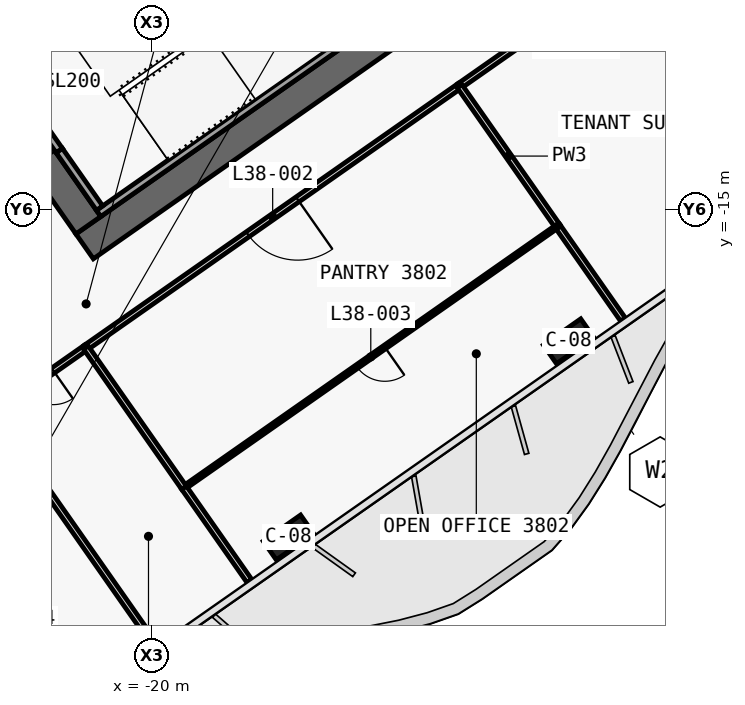
"""IFC4 building model, lengths in metres.
Left out: names, types, materials, properties, quantities, classifications, styles, units other than length and angle.
Written with IfcOpenShell. Run it as: python <this file> out.ifc"""

import sys

from ifc_helpers import new_model, si_unit, direction, frame, frame_2d, origin, origin_2d, place, context, subcontext, project, spatial, polyline, rectangle, outline, extrude, element, fill, save


model = new_model("IFC4")
c1 = context("Model", 3, precision=1e-05, world=origin(), true_north=direction((0.0, 1.0)))
c2 = subcontext(c1, "Body", "Model", "MODEL_VIEW")
j1 = project(units=[si_unit("LENGTHUNIT", "METRE"), si_unit("PLANEANGLEUNIT", "RADIAN")], contexts=[c1])
p1 = place(None, origin())
s1 = spatial("IfcSite", under=j1, at=p1, CompositionType="ELEMENT")
p2 = place(p1, origin())
s2 = spatial("IfcBuilding", under=s1, at=p2, CompositionType="ELEMENT")
p3 = place(p2, frame((0.0, 0.0, 167.1)))
s3 = spatial("IfcBuildingStorey", under=s2, at=p3, CompositionType="ELEMENT", Elevation=167.1)
p4 = place(p3, frame((0.029, -0.712, 0.0), z_axis=(0.0, 0.0, 1.0), x_axis=(-0.819151758019, -0.573576845187, 0.0)))
e1 = element("IfcWall", 1, at=p4, inside=s3, PredefinedType="SHEAR", context=c2, shape_type="SweptSolid", body=[
    extrude(outline(polyline([(26.616, 0.4), (0.56, 0.4), (-0.0, -0.4), (26.616, -0.4), (26.616, 0.4)])), origin(), (0.0, 0.0, 1.0), 3.9),
])
p5 = place(p4, frame((2.966, 0.0, 0.0)))
e2 = element("IfcOpeningElement", 2, at=p5, cuts=e1, PredefinedType="OPENING", context=c2, shape_type="SweptSolid", body=[
    extrude(rectangle(XDim=2.4, YDim=2.1, at=frame_2d((1.2, 1.05))), frame((0.0, 0.41, 0.0), z_axis=(0.0, -1.0, 0.0), x_axis=(1.0, 0.0, 0.0)), (0.0, 0.0, 1.0), 0.82),
])
p6 = place(p4, frame((11.916, 0.0, 0.0)))
e3 = element("IfcOpeningElement", 3, at=p6, cuts=e1, PredefinedType="OPENING", context=c2, shape_type="SweptSolid", body=[
    extrude(rectangle(XDim=2.4, YDim=2.1, at=frame_2d((1.2, 1.05))), frame((0.0, 0.41, 0.0), z_axis=(0.0, -1.0, 0.0), x_axis=(1.0, 0.0, 0.0)), (0.0, 0.0, 1.0), 0.82),
])
p7 = place(p3, frame((-21.675, -15.421, 0.0), z_axis=(0.0, 0.0, 1.0), x_axis=(-0.573581815061, 0.819148278049, 0.0)))
e4 = element("IfcWall", 4, at=p7, inside=s3, PredefinedType="SHEAR", context=c2, shape_type="SweptSolid", body=[
    extrude(outline(polyline([(0.0, 0.4), (0.0, -0.4), (9.6, -0.4), (9.6, 0.4), (0.0, 0.4)])), origin(), (0.0, 0.0, 1.0), 3.9),
])
p8 = place(p7, frame((6.3, 0.0, 0.0)))
e5 = element("IfcOpeningElement", 5, at=p8, cuts=e4, PredefinedType="OPENING", context=c2, shape_type="SweptSolid", body=[
    extrude(rectangle(XDim=1.8, YDim=2.1, at=frame_2d((0.9, 1.05))), frame((0.0, 0.41, 0.0), z_axis=(0.0, -1.0, 0.0), x_axis=(1.0, 0.0, 0.0)), (0.0, 0.0, 1.0), 0.82),
])
p9 = place(p7, frame((2.1, 0.0, 0.0)))
e6 = element("IfcOpeningElement", 6, at=p9, cuts=e4, PredefinedType="OPENING", context=c2, shape_type="SweptSolid", body=[
    extrude(rectangle(XDim=1.8, YDim=2.1, at=frame_2d((0.9, 1.05))), frame((0.0, 0.41, 0.0), z_axis=(0.0, -1.0, 0.0), x_axis=(1.0, 0.0, 0.0)), (0.0, 0.0, 1.0), 0.82),
])
p10 = place(p3, frame((-2.638, 3.768, 0.0), z_axis=(0.0, 0.0, 1.0), x_axis=(-0.81915267502, -0.573575535572, 0.0)))
e7 = element("IfcWall", 7, at=p10, inside=s3, PredefinedType="SHEAR", context=c2, shape_type="SweptSolid", body=[
    extrude(outline(polyline([(26.2, 0.2), (0.0, 0.2), (0.0, -0.2), (26.2, -0.2), (26.2, 0.2)])), origin(), (0.0, 0.0, 1.0), 3.9),
])
p11 = place(p10, frame((1.169, 0.0, 0.0)))
e8 = element("IfcOpeningElement", 8, at=p11, cuts=e7, PredefinedType="OPENING", context=c2, shape_type="SweptSolid", body=[
    extrude(rectangle(XDim=1.1, YDim=2.1, at=frame_2d((0.55, 1.05))), frame((0.0, 0.21, 0.0), z_axis=(0.0, -1.0, 0.0), x_axis=(1.0, 0.0, 0.0)), (0.0, 0.0, 1.0), 0.42),
])
p12 = place(p10, frame((3.206, 0.0, 0.0)))
e9 = element("IfcOpeningElement", 9, at=p12, cuts=e7, PredefinedType="OPENING", context=c2, shape_type="SweptSolid", body=[
    extrude(rectangle(XDim=1.1, YDim=2.1, at=frame_2d((0.55, 1.05))), frame((0.0, 0.21, 0.0), z_axis=(0.0, -1.0, 0.0), x_axis=(1.0, 0.0, 0.0)), (0.0, 0.0, 1.0), 0.42),
])
p13 = place(p10, frame((5.244, 0.0, 0.0)))
e10 = element("IfcOpeningElement", 10, at=p13, cuts=e7, PredefinedType="OPENING", context=c2, shape_type="SweptSolid", body=[
    extrude(rectangle(XDim=1.1, YDim=2.1, at=frame_2d((0.55, 1.05))), frame((0.0, 0.21, 0.0), z_axis=(0.0, -1.0, 0.0), x_axis=(1.0, 0.0, 0.0)), (0.0, 0.0, 1.0), 0.42),
])
p14 = place(p10, frame((7.281, 0.0, 0.0)))
e11 = element("IfcOpeningElement", 11, at=p14, cuts=e7, PredefinedType="OPENING", context=c2, shape_type="SweptSolid", body=[
    extrude(rectangle(XDim=1.1, YDim=2.1, at=frame_2d((0.55, 1.05))), frame((0.0, 0.21, 0.0), z_axis=(0.0, -1.0, 0.0), x_axis=(1.0, 0.0, 0.0)), (0.0, 0.0, 1.0), 0.42),
])
p15 = place(p10, frame((9.688, 0.0, 0.0)))
e12 = element("IfcOpeningElement", 12, at=p15, cuts=e7, PredefinedType="OPENING", context=c2, shape_type="SweptSolid", body=[
    extrude(rectangle(XDim=1.1, YDim=2.1, at=frame_2d((0.55, 1.05))), frame((0.0, 0.21, 0.0), z_axis=(0.0, -1.0, 0.0), x_axis=(1.0, 0.0, 0.0)), (0.0, 0.0, 1.0), 0.42),
])
p16 = place(p10, frame((11.863, 0.0, 0.0)))
e13 = element("IfcOpeningElement", 13, at=p16, cuts=e7, PredefinedType="OPENING", context=c2, shape_type="SweptSolid", body=[
    extrude(rectangle(XDim=1.1, YDim=2.1, at=frame_2d((0.55, 1.05))), frame((0.0, 0.21, 0.0), z_axis=(0.0, -1.0, 0.0), x_axis=(1.0, 0.0, 0.0)), (0.0, 0.0, 1.0), 0.42),
])
p17 = place(p10, frame((14.038, 0.0, 0.0)))
e14 = element("IfcOpeningElement", 14, at=p17, cuts=e7, PredefinedType="OPENING", context=c2, shape_type="SweptSolid", body=[
    extrude(rectangle(XDim=1.1, YDim=2.1, at=frame_2d((0.55, 1.05))), frame((0.0, 0.21, 0.0), z_axis=(0.0, -1.0, 0.0), x_axis=(1.0, 0.0, 0.0)), (0.0, 0.0, 1.0), 0.42),
])
p18 = place(p10, frame((16.212, 0.0, 0.0)))
e15 = element("IfcOpeningElement", 15, at=p18, cuts=e7, PredefinedType="OPENING", context=c2, shape_type="SweptSolid", body=[
    extrude(rectangle(XDim=1.1, YDim=2.1, at=frame_2d((0.55, 1.05))), frame((0.0, 0.21, 0.0), z_axis=(0.0, -1.0, 0.0), x_axis=(1.0, 0.0, 0.0)), (0.0, 0.0, 1.0), 0.42),
])
for number, where, z_axis, x_axis in (
    (16, (-9.038, -18.475, 0.0), (0.0, 0.0, 1.0), (-0.819, -0.574, 0.0)),
    (17, (-16.41, -23.637, 0.0), (0.0, 0.0, 1.0), (-0.819, -0.574, 0.0)),
):
    element("IfcColumn", number, at=place(p3, frame(where, z_axis=z_axis, x_axis=x_axis)), inside=s3, PredefinedType="COLUMN", context=c2, shape_type="SweptSolid", body=[
        extrude(rectangle(XDim=1.2, YDim=0.6, at=origin_2d()), origin(), (0.0, 0.0, 1.0), 3.9),
    ])
p19 = place(p3, frame((-14.851, -10.521, 0.0), z_axis=(0.0, 0.0, 1.0), x_axis=(-0.819141584393, -0.57359137434, 0.0)))
e18 = element("IfcWall", 18, at=p19, inside=s3, PredefinedType="SOLIDWALL", context=c2, shape_type="SweptSolid", body=[
    extrude(rectangle(XDim=8.0, YDim=0.2, at=frame_2d((4.0, 0.0))), origin(), (0.0, 0.0, 1.0), 3.62),
])
p20 = place(p3, frame((-21.38, -14.97, 0.0), z_axis=(0.0, 0.0, 1.0), x_axis=(-0.573559770908, 0.819163713305, 0.0)))
e19 = element("IfcWall", 19, at=p20, inside=s3, PredefinedType="SOLIDWALL", context=c2, shape_type="SweptSolid", body=[
    extrude(rectangle(XDim=1.85, YDim=0.2, at=frame_2d((0.925, 0.0))), origin(), (0.0, 0.0, 1.0), 3.62),
])
p21 = place(p3, frame((-22.441, -13.455, 2.15), z_axis=(0.0, 0.0, 1.0), x_axis=(-0.573591692345, 0.819141361715, 0.0)))
e20 = element("IfcWall", 20, at=p21, inside=s3, PredefinedType="SOLIDWALL", context=c2, shape_type="SweptSolid", body=[
    extrude(rectangle(XDim=1.9, YDim=0.2, at=frame_2d((0.95, 0.0))), origin(), (0.0, 0.0, 1.0), 1.47),
])
p22 = place(p3, frame((-5.766, -7.456, 0.0), z_axis=(0.0, 0.0, 1.0), x_axis=(-0.819150881364, -0.573578097177, 0.0)))
e21 = element("IfcWall", 21, at=p22, inside=s3, PredefinedType="PARTITIONING", context=c2, shape_type="SweptSolid", body=[
    extrude(rectangle(XDim=7.502, YDim=0.15, at=frame_2d((3.751, 0.0))), origin(), (0.0, 0.0, 1.0), 3.0),
])
p23 = place(p22, frame((2.951, 0.0, 0.0)))
e22 = element("IfcOpeningElement", 22, at=p23, cuts=e21, PredefinedType="OPENING", context=c2, shape_type="SweptSolid", body=[
    extrude(rectangle(XDim=1.6, YDim=2.1, at=frame_2d((0.8, 1.05))), frame((0.0, 0.085, 0.0), z_axis=(0.0, -1.0, 0.0), x_axis=(1.0, 0.0, 0.0)), (0.0, 0.0, 1.0), 0.17),
])
p24 = place(p3, frame((-11.908, -11.757, 0.0), z_axis=(0.0, 0.0, 1.0), x_axis=(-0.81915738424, -0.573568810035, 0.0)))
e23 = element("IfcWall", 23, at=p24, inside=s3, PredefinedType="PARTITIONING", context=c2, shape_type="SweptSolid", body=[
    extrude(rectangle(XDim=12.004, YDim=0.15, at=frame_2d((6.002, 0.0))), origin(), (0.0, 0.0, 1.0), 3.0),
])
p25 = place(p24, frame((5.202, 0.0, 0.0)))
e24 = element("IfcOpeningElement", 24, at=p25, cuts=e23, PredefinedType="OPENING", context=c2, shape_type="SweptSolid", body=[
    extrude(rectangle(XDim=1.6, YDim=2.1, at=frame_2d((0.8, 1.05))), frame((0.0, 0.085, 0.0), z_axis=(0.0, -1.0, 0.0), x_axis=(1.0, 0.0, 0.0)), (0.0, 0.0, 1.0), 0.17),
])
p26 = place(p3, frame((-21.738, -18.639, 0.0), z_axis=(0.0, 0.0, 1.0), x_axis=(-0.819128818764, -0.573609604409, 0.0)))
e25 = element("IfcWall", 25, at=p26, inside=s3, PredefinedType="PARTITIONING", context=c2, shape_type="SweptSolid", body=[
    extrude(rectangle(XDim=3.004, YDim=0.15, at=frame_2d((1.502, 0.0))), origin(), (0.0, 0.0, 1.0), 3.62),
])
p27 = place(p26, frame((1.052, 0.0, 0.0)))
e26 = element("IfcOpeningElement", 26, at=p27, cuts=e25, PredefinedType="OPENING", context=c2, shape_type="SweptSolid", body=[
    extrude(rectangle(XDim=0.9, YDim=2.1, at=frame_2d((0.45, 1.05))), frame((0.0, 0.085, 0.0), z_axis=(0.0, -1.0, 0.0), x_axis=(1.0, 0.0, 0.0)), (0.0, 0.0, 1.0), 0.17),
])
p28 = place(p3, frame((-7.608, -17.901, 0.0), z_axis=(0.0, 0.0, 1.0), x_axis=(-0.573609750632, 0.819128716369, 0.0)))
e27 = element("IfcWall", 27, at=p28, inside=s3, PredefinedType="PARTITIONING", context=c2, shape_type="SweptSolid", body=[
    extrude(rectangle(XDim=3.001, YDim=0.15, at=frame_2d((1.5, 0.0))), origin(), (0.0, 0.0, 1.0), 2.9),
])
p29 = place(p3, frame((-9.328, -15.446, 0.0), z_axis=(0.0, 0.0, 1.0), x_axis=(-0.573527854296, 0.819186059663, 0.0)))
e28 = element("IfcWall", 28, at=p29, inside=s3, PredefinedType="PARTITIONING", context=c2, shape_type="SweptSolid", body=[
    extrude(rectangle(XDim=4.502, YDim=0.15, at=frame_2d((2.251, 0.0))), origin(), (0.0, 0.0, 1.0), 3.62),
])
p30 = place(p3, frame((-9.328, -15.445, 0.0), z_axis=(0.0, 0.0, 1.0), x_axis=(-0.819146845232, -0.573583861302, 0.0)))
e29 = element("IfcWall", 29, at=p30, inside=s3, PredefinedType="PARTITIONING", context=c2, shape_type="SweptSolid", body=[
    extrude(rectangle(XDim=12.0, YDim=0.1, at=frame_2d((6.0, 0.0))), origin(), (0.0, 0.0, 1.0), 3.0),
])
p31 = place(p30, frame((5.55, 0.0, 0.0)))
e30 = element("IfcOpeningElement", 30, at=p31, cuts=e29, PredefinedType="OPENING", context=c2, shape_type="SweptSolid", body=[
    extrude(rectangle(XDim=0.9, YDim=2.1, at=frame_2d((0.45, 1.05))), frame((0.0, 0.06, 0.0), z_axis=(0.0, -1.0, 0.0), x_axis=(1.0, 0.0, 0.0)), (0.0, 0.0, 1.0), 0.12),
])
p32 = place(p3, frame((-17.438, -24.784, 0.0), z_axis=(0.0, 0.0, 1.0), x_axis=(-0.573604390867, 0.819132469615, 0.0)))
e31 = element("IfcWall", 31, at=p32, inside=s3, PredefinedType="PARTITIONING", context=c2, shape_type="SweptSolid", body=[
    extrude(rectangle(XDim=2.999, YDim=0.15, at=frame_2d((1.5, 0.0))), origin(), (0.0, 0.0, 1.0), 2.9),
])
p33 = place(p3, frame((-19.159, -22.327, 0.0), z_axis=(0.0, 0.0, 1.0), x_axis=(-0.573586141663, 0.819145248471, 0.0)))
e32 = element("IfcWall", 32, at=p33, inside=s3, PredefinedType="PARTITIONING", context=c2, shape_type="SweptSolid", body=[
    extrude(rectangle(XDim=4.5, YDim=0.15, at=frame_2d((2.25, 0.0))), origin(), (0.0, 0.0, 1.0), 3.62),
])
p34 = place(p3, frame((-19.896, -26.505, 0.0), z_axis=(0.0, 0.0, 1.0), x_axis=(-0.573575945067, 0.81915238829, 0.0)))
e33 = element("IfcWall", 33, at=p34, inside=s3, PredefinedType="PARTITIONING", context=c2, shape_type="SweptSolid", body=[
    extrude(rectangle(XDim=7.5, YDim=0.15, at=frame_2d((3.75, 0.0))), origin(), (0.0, 0.0, 1.0), 2.9),
])
p35 = place(p25, origin())
e34 = element("IfcDoor", 34, at=p35, inside=s3, OperationType="DOUBLE_DOOR_SINGLE_SWING", PredefinedType="DOOR", context=c2, shape_type="SweptSolid", body=[
    extrude(rectangle(XDim=1.6, YDim=2.1, at=frame_2d((0.8, 1.05))), frame((0.0, 0.025, 0.0), z_axis=(0.0, -1.0, 0.0), x_axis=(1.0, 0.0, 0.0)), (0.0, 0.0, 1.0), 0.05),
])
fill(e24, e34)
p36 = place(p31, origin())
e35 = element("IfcDoor", 35, at=p36, inside=s3, OperationType="SINGLE_SWING_LEFT", PredefinedType="DOOR", context=c2, shape_type="SweptSolid", body=[
    extrude(rectangle(XDim=0.9, YDim=2.1, at=frame_2d((0.45, 1.05))), frame((0.0, 0.025, 0.0), z_axis=(0.0, -1.0, 0.0), x_axis=(1.0, 0.0, 0.0)), (0.0, 0.0, 1.0), 0.05),
])
fill(e30, e35)
p37 = place(p27, origin())
e36 = element("IfcDoor", 36, at=p37, inside=s3, OperationType="SINGLE_SWING_LEFT", PredefinedType="DOOR", context=c2, shape_type="SweptSolid", body=[
    extrude(rectangle(XDim=0.9, YDim=2.1, at=frame_2d((0.45, 1.05))), frame((0.0, 0.025, 0.0), z_axis=(0.0, -1.0, 0.0), x_axis=(1.0, 0.0, 0.0)), (0.0, 0.0, 1.0), 0.05),
])
fill(e26, e36)
save(model, sys.argv[1])
